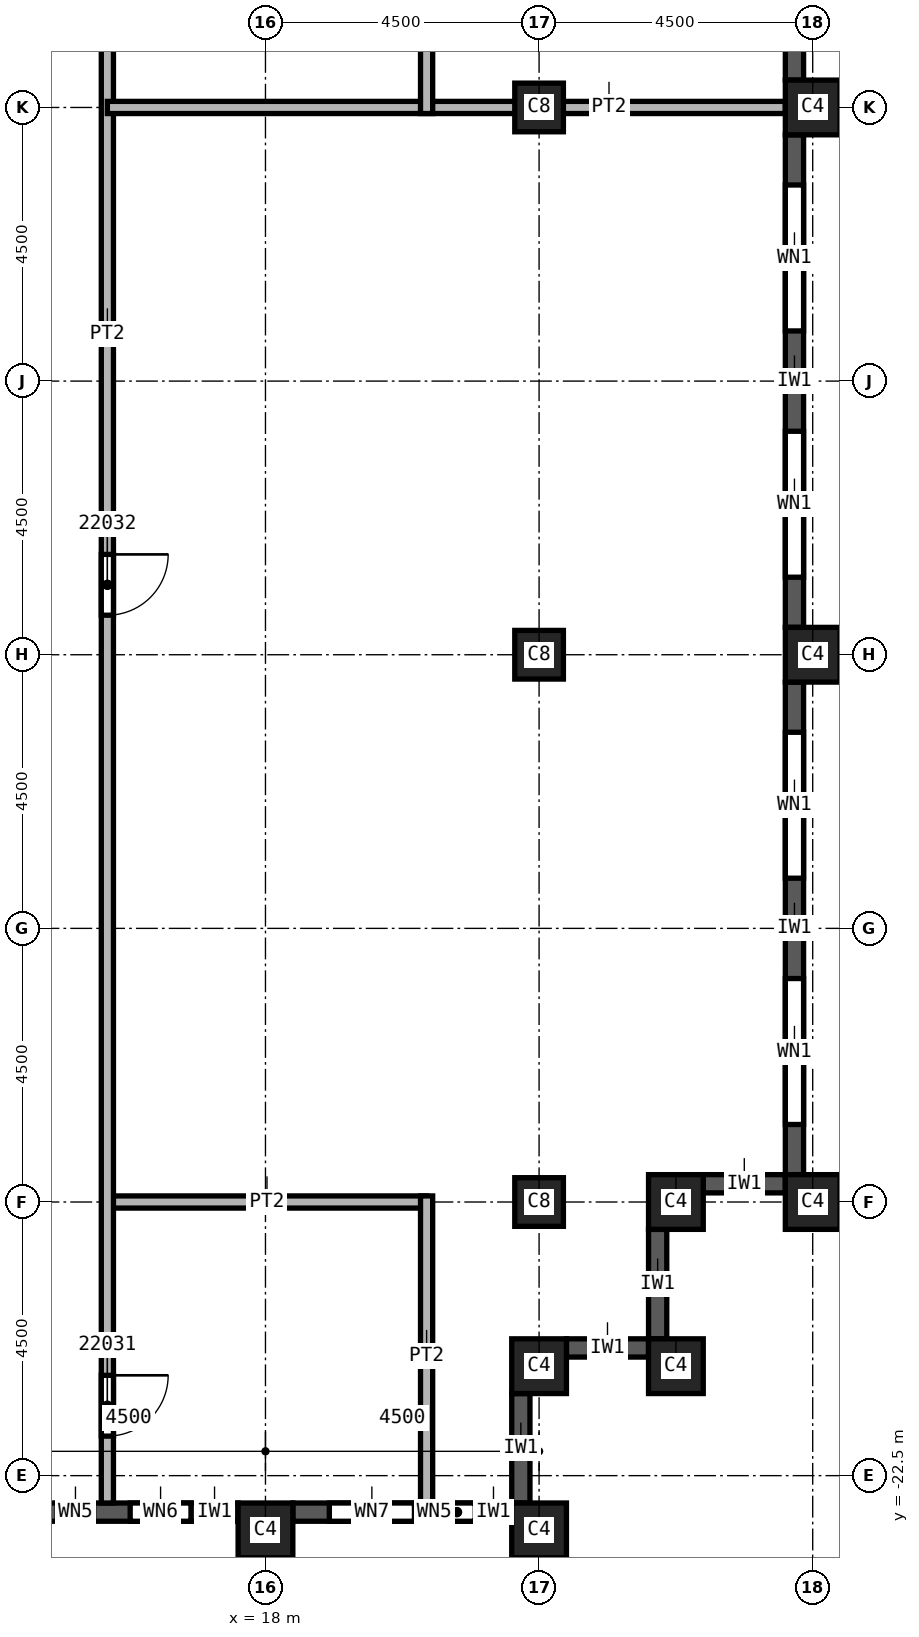
"""IFC4 building model, lengths in metres.
Left out: names, types, materials, properties, quantities, classifications, styles, units other than length and angle.
Written with IfcOpenShell. Run it as: python <this file> out.ifc"""

import sys

from ifc_helpers import new_model, si_unit, direction, frame, frame_2d, origin, origin_2d, place, context, subcontext, project, spatial, rectangle, extrude, element, fill, save


model = new_model("IFC4")
c1 = context("Model", 3, precision=1e-05, world=origin(), true_north=direction((0.0, 1.0)))
c2 = subcontext(c1, "Body", "Model", "MODEL_VIEW")
j1 = project(units=[si_unit("LENGTHUNIT", "METRE"), si_unit("PLANEANGLEUNIT", "RADIAN")], contexts=[c1])
p1 = place(None, origin())
s1 = spatial("IfcSite", under=j1, at=p1, CompositionType="ELEMENT")
p2 = place(p1, origin())
s2 = spatial("IfcBuilding", under=s1, at=p2, CompositionType="ELEMENT")
p3 = place(p2, frame((0.0, 0.0, 312.0)))
s3 = spatial("IfcBuildingStorey", under=s2, at=p3, CompositionType="ELEMENT", Elevation=312.0)
for number, where, z_axis, x_axis in (
    (1, (22.5, 0.0, 0.0), (0.0, 0.0, 1.0), (1.0, 0.0, 0.0)),
    (2, (22.5, -9.0, 0.0), (0.0, 0.0, 1.0), (1.0, 0.0, 0.0)),
    (3, (22.5, -18.0, 0.0), (0.0, 0.0, 1.0), (1.0, 0.0, 0.0)),
):
    element("IfcColumn", number, at=place(p3, frame(where, z_axis=z_axis, x_axis=x_axis)), inside=s3, PredefinedType="COLUMN", context=c2, shape_type="SweptSolid", body=[
        extrude(rectangle(XDim=0.8, YDim=0.8, at=origin_2d()), origin(), (0.0, 0.0, 1.0), 3.74),
    ])
for number, where, z_axis, x_axis in (
    (4, (27.0, 0.0, 0.0), (0.0, 0.0, 1.0), (0.0, 1.0, 0.0)),
    (5, (27.0, -9.0, 0.0), (0.0, 0.0, 1.0), (0.0, 1.0, 0.0)),
    (6, (27.0, -18.0, 0.0), (0.0, 0.0, 1.0), (0.0, 1.0, 0.0)),
    (7, (18.0, -23.4, 0.0), (0.0, 0.0, 1.0), (1.0, 0.0, 0.0)),
    (8, (22.5, -23.4, 0.0), (0.0, 0.0, 1.0), (1.0, 0.0, 0.0)),
    (9, (22.5, -20.7, 0.0), (0.0, 0.0, 1.0), (1.0, 0.0, 0.0)),
    (10, (24.75, -20.7, 0.0), (0.0, 0.0, 1.0), (1.0, 0.0, 0.0)),
    (11, (24.75, -18.0, 0.0), (0.0, 0.0, 1.0), (1.0, 0.0, 0.0)),
):
    element("IfcColumn", number, at=place(p3, frame(where, z_axis=z_axis, x_axis=x_axis)), inside=s3, PredefinedType="COLUMN", context=c2, shape_type="SweptSolid", body=[
        extrude(rectangle(XDim=0.9, YDim=0.9, at=origin_2d()), origin(), (0.0, 0.0, 1.0), 3.74),
    ])
p4 = place(p3, frame((13.95, -23.1, 0.0), z_axis=(0.0, 0.0, 1.0), x_axis=(1.0, 0.0, 0.0)))
e12 = element("IfcWall", 12, at=p4, inside=s3, PredefinedType="SOLIDWALL", context=c2, shape_type="SweptSolid", body=[
    extrude(rectangle(XDim=3.6, YDim=0.3, at=frame_2d((1.8, 0.0))), origin(), (0.0, 0.0, 1.0), 3.14),
])
p5 = place(p4, frame((0.625, 0.0, 0.8)))
e13 = element("IfcOpeningElement", 13, at=p5, cuts=e12, PredefinedType="OPENING", context=c2, shape_type="SweptSolid", body=[
    extrude(rectangle(XDim=0.6, YDim=1.95, at=frame_2d((0.3, 0.975))), frame((0.0, 0.15, 0.0), z_axis=(0.0, -1.0, 0.0), x_axis=(1.0, 0.0, 0.0)), (0.0, 0.0, 1.0), 0.3),
])
p6 = place(p4, frame((1.825, 0.0, 0.8)))
e14 = element("IfcOpeningElement", 14, at=p6, cuts=e12, PredefinedType="OPENING", context=c2, shape_type="SweptSolid", body=[
    extrude(rectangle(XDim=1.0, YDim=1.95, at=frame_2d((0.5, 0.975))), frame((0.0, 0.15, 0.0), z_axis=(0.0, -1.0, 0.0), x_axis=(1.0, 0.0, 0.0)), (0.0, 0.0, 1.0), 0.3),
])
p7 = place(p3, frame((18.45, -23.1, 0.0), z_axis=(0.0, 0.0, 1.0), x_axis=(1.0, 0.0, 0.0)))
e15 = element("IfcWall", 15, at=p7, inside=s3, PredefinedType="SOLIDWALL", context=c2, shape_type="SweptSolid", body=[
    extrude(rectangle(XDim=3.6, YDim=0.3, at=frame_2d((1.8, 0.0))), origin(), (0.0, 0.0, 1.0), 3.14),
])
p8 = place(p7, frame((0.6, 0.0, 0.8)))
e16 = element("IfcOpeningElement", 16, at=p8, cuts=e15, PredefinedType="OPENING", context=c2, shape_type="SweptSolid", body=[
    extrude(rectangle(XDim=1.4, YDim=1.95, at=frame_2d((0.7, 0.975))), frame((0.0, 0.15, 0.0), z_axis=(0.0, -1.0, 0.0), x_axis=(1.0, 0.0, 0.0)), (0.0, 0.0, 1.0), 0.3),
])
p9 = place(p7, frame((2.4, 0.0, 0.8)))
e17 = element("IfcOpeningElement", 17, at=p9, cuts=e15, PredefinedType="OPENING", context=c2, shape_type="SweptSolid", body=[
    extrude(rectangle(XDim=0.6, YDim=1.95, at=frame_2d((0.3, 0.975))), frame((0.0, 0.15, 0.0), z_axis=(0.0, -1.0, 0.0), x_axis=(1.0, 0.0, 0.0)), (0.0, 0.0, 1.0), 0.3),
])
p10 = place(p3, frame((22.2, -22.95, 0.0), z_axis=(0.0, 0.0, 1.0), x_axis=(0.0, 1.0, 0.0)))
e18 = element("IfcWall", 18, at=p10, inside=s3, PredefinedType="SOLIDWALL", context=c2, shape_type="SweptSolid", body=[
    extrude(rectangle(XDim=1.8, YDim=0.3, at=frame_2d((0.9, 0.0))), origin(), (0.0, 0.0, 1.0), 3.14),
])
p11 = place(p3, frame((22.95, -20.4, 0.0), z_axis=(0.0, 0.0, 1.0), x_axis=(1.0, 0.0, 0.0)))
e19 = element("IfcWall", 19, at=p11, inside=s3, PredefinedType="SOLIDWALL", context=c2, shape_type="SweptSolid", body=[
    extrude(rectangle(XDim=1.35, YDim=0.3, at=frame_2d((0.675, 0.0))), origin(), (0.0, 0.0, 1.0), 3.14),
])
p12 = place(p3, frame((24.45, -20.25, 0.0), z_axis=(0.0, 0.0, 1.0), x_axis=(0.0, 1.0, 0.0)))
e20 = element("IfcWall", 20, at=p12, inside=s3, PredefinedType="SOLIDWALL", context=c2, shape_type="SweptSolid", body=[
    extrude(rectangle(XDim=1.8, YDim=0.3, at=frame_2d((0.9, 0.0))), origin(), (0.0, 0.0, 1.0), 3.14),
])
p13 = place(p3, frame((25.2, -17.7, 0.0), z_axis=(0.0, 0.0, 1.0), x_axis=(1.0, 0.0, 0.0)))
e21 = element("IfcWall", 21, at=p13, inside=s3, PredefinedType="SOLIDWALL", context=c2, shape_type="SweptSolid", body=[
    extrude(rectangle(XDim=1.35, YDim=0.3, at=frame_2d((0.675, 0.0))), origin(), (0.0, 0.0, 1.0), 3.14),
])
p14 = place(p3, frame((26.7, -17.55, 0.0), z_axis=(0.0, 0.0, 1.0), x_axis=(0.0, 1.0, 0.0)))
e22 = element("IfcWall", 22, at=p14, inside=s3, PredefinedType="SOLIDWALL", context=c2, shape_type="SweptSolid", body=[
    extrude(rectangle(XDim=8.1, YDim=0.3, at=frame_2d((4.05, 0.0))), origin(), (0.0, 0.0, 1.0), 3.14),
])
p15 = place(p14, frame((0.825, 0.0, 0.8)))
e23 = element("IfcOpeningElement", 23, at=p15, cuts=e22, PredefinedType="OPENING", context=c2, shape_type="SweptSolid", body=[
    extrude(rectangle(XDim=2.4, YDim=1.95, at=frame_2d((1.2, 0.975))), frame((0.0, 0.15, 0.0), z_axis=(0.0, -1.0, 0.0), x_axis=(1.0, 0.0, 0.0)), (0.0, 0.0, 1.0), 0.3),
])
p16 = place(p14, frame((4.875, 0.0, 0.8)))
e24 = element("IfcOpeningElement", 24, at=p16, cuts=e22, PredefinedType="OPENING", context=c2, shape_type="SweptSolid", body=[
    extrude(rectangle(XDim=2.4, YDim=1.95, at=frame_2d((1.2, 0.975))), frame((0.0, 0.15, 0.0), z_axis=(0.0, -1.0, 0.0), x_axis=(1.0, 0.0, 0.0)), (0.0, 0.0, 1.0), 0.3),
])
p17 = place(p3, frame((26.7, -8.55, 0.0), z_axis=(0.0, 0.0, 1.0), x_axis=(0.0, 1.0, 0.0)))
e25 = element("IfcWall", 25, at=p17, inside=s3, PredefinedType="SOLIDWALL", context=c2, shape_type="SweptSolid", body=[
    extrude(rectangle(XDim=8.1, YDim=0.3, at=frame_2d((4.05, 0.0))), origin(), (0.0, 0.0, 1.0), 3.14),
])
p18 = place(p17, frame((0.825, 0.0, 0.8)))
e26 = element("IfcOpeningElement", 26, at=p18, cuts=e25, PredefinedType="OPENING", context=c2, shape_type="SweptSolid", body=[
    extrude(rectangle(XDim=2.4, YDim=1.95, at=frame_2d((1.2, 0.975))), frame((0.0, 0.15, 0.0), z_axis=(0.0, -1.0, 0.0), x_axis=(1.0, 0.0, 0.0)), (0.0, 0.0, 1.0), 0.3),
])
p19 = place(p17, frame((4.875, 0.0, 0.8)))
e27 = element("IfcOpeningElement", 27, at=p19, cuts=e25, PredefinedType="OPENING", context=c2, shape_type="SweptSolid", body=[
    extrude(rectangle(XDim=2.4, YDim=1.95, at=frame_2d((1.2, 0.975))), frame((0.0, 0.15, 0.0), z_axis=(0.0, -1.0, 0.0), x_axis=(1.0, 0.0, 0.0)), (0.0, 0.0, 1.0), 0.3),
])
p20 = place(p3, frame((26.7, 0.45, 0.0), z_axis=(0.0, 0.0, 1.0), x_axis=(0.0, 1.0, 0.0)))
e28 = element("IfcWall", 28, at=p20, inside=s3, PredefinedType="SOLIDWALL", context=c2, shape_type="SweptSolid", body=[
    extrude(rectangle(XDim=8.1, YDim=0.3, at=frame_2d((4.05, 0.0))), origin(), (0.0, 0.0, 1.0), 3.14),
])
p21 = place(p20, frame((0.825, 0.0, 0.8)))
e29 = element("IfcOpeningElement", 29, at=p21, cuts=e28, PredefinedType="OPENING", context=c2, shape_type="SweptSolid", body=[
    extrude(rectangle(XDim=2.4, YDim=1.95, at=frame_2d((1.2, 0.975))), frame((0.0, 0.15, 0.0), z_axis=(0.0, -1.0, 0.0), x_axis=(1.0, 0.0, 0.0)), (0.0, 0.0, 1.0), 0.3),
])
p22 = place(p20, frame((4.875, 0.0, 0.8)))
e30 = element("IfcOpeningElement", 30, at=p22, cuts=e28, PredefinedType="OPENING", context=c2, shape_type="SweptSolid", body=[
    extrude(rectangle(XDim=2.4, YDim=1.95, at=frame_2d((1.2, 0.975))), frame((0.0, 0.15, 0.0), z_axis=(0.0, -1.0, 0.0), x_axis=(1.0, 0.0, 0.0)), (0.0, 0.0, 1.0), 0.3),
])
p23 = place(p3, frame((15.4, -18.0, 0.0), z_axis=(0.0, 0.0, 1.0), x_axis=(1.0, 0.0, 0.0)))
e31 = element("IfcWall", 31, at=p23, inside=s3, PredefinedType="PARTITIONING", context=c2, shape_type="SweptSolid", body=[
    extrude(rectangle(XDim=5.25, YDim=0.2, at=frame_2d((2.625, 0.0))), origin(), (0.0, 0.0, 1.0), 3.74),
])
p24 = place(p3, frame((15.4, 22.95, 0.0), z_axis=(0.0, 0.0, 1.0), x_axis=(0.0, -1.0, 0.0)))
e32 = element("IfcWall", 32, at=p24, inside=s3, PredefinedType="PARTITIONING", context=c2, shape_type="SweptSolid", body=[
    extrude(rectangle(XDim=45.9, YDim=0.2, at=frame_2d((22.95, 0.0))), origin(), (0.0, 0.0, 1.0), 3.74),
])
p25 = place(p24, frame((15.0, 0.0, 0.0)))
e33 = element("IfcOpeningElement", 33, at=p25, cuts=e32, PredefinedType="OPENING", context=c2, shape_type="SweptSolid", body=[
    extrude(rectangle(XDim=1.0, YDim=2.1, at=frame_2d((0.5, 1.05))), frame((0.0, 0.1, 0.0), z_axis=(0.0, -1.0, 0.0), x_axis=(1.0, 0.0, 0.0)), (0.0, 0.0, 1.0), 0.2),
])
p26 = place(p24, frame((8.05, 0.0, 0.0)))
e34 = element("IfcOpeningElement", 34, at=p26, cuts=e32, PredefinedType="OPENING", context=c2, shape_type="SweptSolid", body=[
    extrude(rectangle(XDim=1.0, YDim=2.1, at=frame_2d((0.5, 1.05))), frame((0.0, 0.1, 0.0), z_axis=(0.0, -1.0, 0.0), x_axis=(1.0, 0.0, 0.0)), (0.0, 0.0, 1.0), 0.2),
])
p27 = place(p24, frame((43.8, 0.0, 0.0)))
e35 = element("IfcOpeningElement", 35, at=p27, cuts=e32, PredefinedType="OPENING", context=c2, shape_type="SweptSolid", body=[
    extrude(rectangle(XDim=1.0, YDim=2.1, at=frame_2d((0.5, 1.05))), frame((0.0, 0.1, 0.0), z_axis=(0.0, -1.0, 0.0), x_axis=(1.0, 0.0, 0.0)), (0.0, 0.0, 1.0), 0.2),
])
p28 = place(p24, frame((30.3, 0.0, 0.0)))
e36 = element("IfcOpeningElement", 36, at=p28, cuts=e32, PredefinedType="OPENING", context=c2, shape_type="SweptSolid", body=[
    extrude(rectangle(XDim=1.0, YDim=2.1, at=frame_2d((0.5, 1.05))), frame((0.0, 0.1, 0.0), z_axis=(0.0, -1.0, 0.0), x_axis=(1.0, 0.0, 0.0)), (0.0, 0.0, 1.0), 0.2),
])
p29 = place(p3, frame((20.65, -17.9, 0.0), z_axis=(0.0, 0.0, 1.0), x_axis=(0.0, -1.0, 0.0)))
e37 = element("IfcWall", 37, at=p29, inside=s3, PredefinedType="PARTITIONING", context=c2, shape_type="SweptSolid", body=[
    extrude(rectangle(XDim=5.05, YDim=0.2, at=frame_2d((2.525, 0.0))), origin(), (0.0, 0.0, 1.0), 3.74),
])
p30 = place(p3, frame((26.55, 0.0, 0.0), z_axis=(0.0, 0.0, 1.0), x_axis=(-1.0, 0.0, 0.0)))
e38 = element("IfcWall", 38, at=p30, inside=s3, PredefinedType="PARTITIONING", context=c2, shape_type="SweptSolid", body=[
    extrude(rectangle(XDim=11.15, YDim=0.2, at=frame_2d((5.575, 0.0))), origin(), (0.0, 0.0, 1.0), 3.74),
])
p31 = place(p3, frame((20.65, 22.95, 0.0), z_axis=(0.0, 0.0, 1.0), x_axis=(0.0, -1.0, 0.0)))
e39 = element("IfcWall", 39, at=p31, inside=s3, PredefinedType="PARTITIONING", context=c2, shape_type="SweptSolid", body=[
    extrude(rectangle(XDim=23.05, YDim=0.2, at=frame_2d((11.525, 0.0))), origin(), (0.0, 0.0, 1.0), 3.74),
])
p32 = place(p31, frame((14.7, 0.0, 0.0)))
e40 = element("IfcOpeningElement", 40, at=p32, cuts=e39, PredefinedType="OPENING", context=c2, shape_type="SweptSolid", body=[
    extrude(rectangle(XDim=1.0, YDim=2.1, at=frame_2d((0.5, 1.05))), frame((0.0, 0.1, 0.0), z_axis=(0.0, -1.0, 0.0), x_axis=(1.0, 0.0, 0.0)), (0.0, 0.0, 1.0), 0.2),
])
p33 = place(p31, frame((7.15, 0.0, 0.0)))
e41 = element("IfcOpeningElement", 41, at=p33, cuts=e39, PredefinedType="OPENING", context=c2, shape_type="SweptSolid", body=[
    extrude(rectangle(XDim=1.0, YDim=2.1, at=frame_2d((0.5, 1.05))), frame((0.0, 0.1, 0.0), z_axis=(0.0, -1.0, 0.0), x_axis=(1.0, 0.0, 0.0)), (0.0, 0.0, 1.0), 0.2),
])
p34 = place(p15, origin())
e42 = element("IfcWindow", 42, at=p34, inside=s3, PartitioningType="SINGLE_PANEL", PredefinedType="WINDOW", context=c2, shape_type="SweptSolid", body=[
    extrude(rectangle(XDim=2.4, YDim=1.95, at=frame_2d((1.2, 0.975))), frame((0.0, 0.03, 0.0), z_axis=(0.0, -1.0, 0.0), x_axis=(1.0, 0.0, 0.0)), (0.0, 0.0, 1.0), 0.06),
])
fill(e23, e42)
p35 = place(p16, origin())
e43 = element("IfcWindow", 43, at=p35, inside=s3, PartitioningType="SINGLE_PANEL", PredefinedType="WINDOW", context=c2, shape_type="SweptSolid", body=[
    extrude(rectangle(XDim=2.4, YDim=1.95, at=frame_2d((1.2, 0.975))), frame((0.0, 0.03, 0.0), z_axis=(0.0, -1.0, 0.0), x_axis=(1.0, 0.0, 0.0)), (0.0, 0.0, 1.0), 0.06),
])
fill(e24, e43)
p36 = place(p18, origin())
e44 = element("IfcWindow", 44, at=p36, inside=s3, PartitioningType="SINGLE_PANEL", PredefinedType="WINDOW", context=c2, shape_type="SweptSolid", body=[
    extrude(rectangle(XDim=2.4, YDim=1.95, at=frame_2d((1.2, 0.975))), frame((0.0, 0.03, 0.0), z_axis=(0.0, -1.0, 0.0), x_axis=(1.0, 0.0, 0.0)), (0.0, 0.0, 1.0), 0.06),
])
fill(e26, e44)
p37 = place(p19, origin())
e45 = element("IfcWindow", 45, at=p37, inside=s3, PartitioningType="SINGLE_PANEL", PredefinedType="WINDOW", context=c2, shape_type="SweptSolid", body=[
    extrude(rectangle(XDim=2.4, YDim=1.95, at=frame_2d((1.2, 0.975))), frame((0.0, 0.03, 0.0), z_axis=(0.0, -1.0, 0.0), x_axis=(1.0, 0.0, 0.0)), (0.0, 0.0, 1.0), 0.06),
])
fill(e27, e45)
p38 = place(p27, origin())
e46 = element("IfcDoor", 46, at=p38, inside=s3, OperationType="SINGLE_SWING_RIGHT", PredefinedType="DOOR", context=c2, shape_type="SweptSolid", body=[
    extrude(rectangle(XDim=1.0, YDim=2.1, at=frame_2d((0.5, 1.05))), frame((0.0, 0.025, 0.0), z_axis=(0.0, -1.0, 0.0), x_axis=(1.0, 0.0, 0.0)), (0.0, 0.0, 1.0), 0.05),
])
fill(e35, e46)
p39 = place(p28, origin())
e47 = element("IfcDoor", 47, at=p39, inside=s3, OperationType="SINGLE_SWING_LEFT", PredefinedType="DOOR", context=c2, shape_type="SweptSolid", body=[
    extrude(rectangle(XDim=1.0, YDim=2.1, at=frame_2d((0.5, 1.05))), frame((0.0, 0.025, 0.0), z_axis=(0.0, -1.0, 0.0), x_axis=(1.0, 0.0, 0.0)), (0.0, 0.0, 1.0), 0.05),
])
fill(e36, e47)
p40 = place(p5, origin())
e48 = element("IfcWindow", 48, at=p40, inside=s3, PartitioningType="SINGLE_PANEL", PredefinedType="WINDOW", context=c2, shape_type="SweptSolid", body=[
    extrude(rectangle(XDim=0.6, YDim=1.95, at=frame_2d((0.3, 0.975))), frame((0.0, 0.03, 0.0), z_axis=(0.0, -1.0, 0.0), x_axis=(1.0, 0.0, 0.0)), (0.0, 0.0, 1.0), 0.06),
])
fill(e13, e48)
p41 = place(p6, origin())
e49 = element("IfcWindow", 49, at=p41, inside=s3, PartitioningType="SINGLE_PANEL", PredefinedType="WINDOW", context=c2, shape_type="SweptSolid", body=[
    extrude(rectangle(XDim=1.0, YDim=1.95, at=frame_2d((0.5, 0.975))), frame((0.0, 0.03, 0.0), z_axis=(0.0, -1.0, 0.0), x_axis=(1.0, 0.0, 0.0)), (0.0, 0.0, 1.0), 0.06),
])
fill(e14, e49)
p42 = place(p8, origin())
e50 = element("IfcWindow", 50, at=p42, inside=s3, PartitioningType="SINGLE_PANEL", PredefinedType="WINDOW", context=c2, shape_type="SweptSolid", body=[
    extrude(rectangle(XDim=1.4, YDim=1.95, at=frame_2d((0.7, 0.975))), frame((0.0, 0.03, 0.0), z_axis=(0.0, -1.0, 0.0), x_axis=(1.0, 0.0, 0.0)), (0.0, 0.0, 1.0), 0.06),
])
fill(e16, e50)
p43 = place(p9, origin())
e51 = element("IfcWindow", 51, at=p43, inside=s3, PartitioningType="SINGLE_PANEL", PredefinedType="WINDOW", context=c2, shape_type="SweptSolid", body=[
    extrude(rectangle(XDim=0.6, YDim=1.95, at=frame_2d((0.3, 0.975))), frame((0.0, 0.03, 0.0), z_axis=(0.0, -1.0, 0.0), x_axis=(1.0, 0.0, 0.0)), (0.0, 0.0, 1.0), 0.06),
])
fill(e17, e51)
save(model, sys.argv[1])
